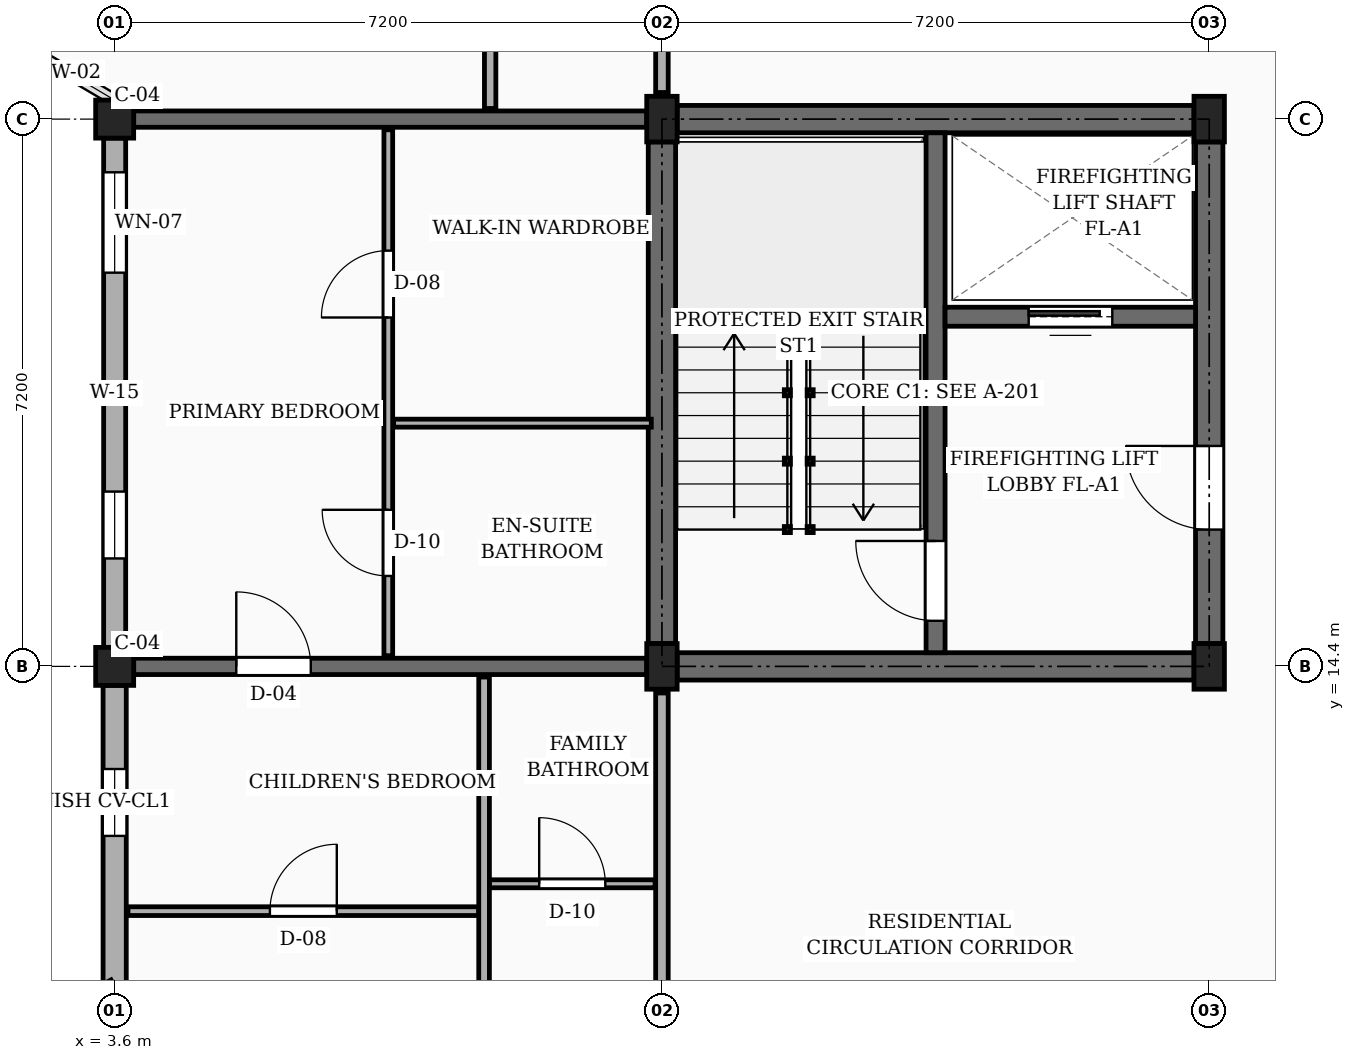
"""IFC4 building model, lengths in metres.
Left out: names, types, materials, properties, quantities, classifications, styles, units other than length and angle.
Written with IfcOpenShell. Run it as: python <this file> out.ifc"""

import sys

from ifc_helpers import new_model, si_unit, direction, frame, frame_2d, origin, origin_2d, place, context, subcontext, project, spatial, rectangle, extrude, element, fill, save


model = new_model("IFC4")
c1 = context("Model", 3, precision=1e-05, world=origin(), true_north=direction((0.0, 1.0)))
c2 = subcontext(c1, "Body", "Model", "MODEL_VIEW")
j1 = project(units=[si_unit("LENGTHUNIT", "METRE"), si_unit("PLANEANGLEUNIT", "RADIAN")], contexts=[c1])
p1 = place(None, origin())
s1 = spatial("IfcSite", under=j1, at=p1, CompositionType="ELEMENT")
p2 = place(p1, origin())
s2 = spatial("IfcBuilding", under=s1, at=p2, CompositionType="ELEMENT")
p3 = place(p2, frame((0.0, 0.0, 29.7)))
s3 = spatial("IfcBuildingStorey", under=s2, at=p3, CompositionType="ELEMENT", Elevation=29.7)
for number, where, z_axis, x_axis in (
    (1, (3.6, 14.4, 0.0), (0.0, 0.0, 1.0), (1.0, 0.0, 0.0)),
    (2, (3.6, 21.6, 0.0), (0.0, 0.0, 1.0), (1.0, 0.0, 0.0)),
):
    element("IfcColumn", number, at=place(p3, frame(where, z_axis=z_axis, x_axis=x_axis)), inside=s3, PredefinedType="COLUMN", context=c2, shape_type="SweptSolid", body=[
        extrude(rectangle(XDim=0.5, YDim=0.5, at=origin_2d()), origin(), (0.0, 0.0, 1.0), 3.15),
    ])
for number, where, z_axis, x_axis in (
    (3, (10.8, 14.4, 0.0), (0.0, 0.0, 1.0), (1.0, 0.0, 0.0)),
    (4, (10.8, 21.6, 0.0), (0.0, 0.0, 1.0), (1.0, 0.0, 0.0)),
    (5, (18.0, 14.4, 0.0), (0.0, 0.0, 1.0), (1.0, 0.0, 0.0)),
    (6, (18.0, 21.6, 0.0), (0.0, 0.0, 1.0), (1.0, 0.0, 0.0)),
):
    element("IfcColumn", number, at=place(p3, frame(where, z_axis=z_axis, x_axis=x_axis)), inside=s3, PredefinedType="COLUMN", context=c2, shape_type="SweptSolid", body=[
        extrude(rectangle(XDim=0.4, YDim=0.6, at=origin_2d()), origin(), (0.0, 0.0, 1.0), 3.15),
    ])
p4 = place(p3, frame((3.85, 14.4, 0.0), z_axis=(0.0, 0.0, 1.0), x_axis=(1.0, 0.0, 0.0)))
e7 = element("IfcWall", 7, at=p4, inside=s3, PredefinedType="SOLIDWALL", context=c2, shape_type="SweptSolid", body=[
    extrude(rectangle(XDim=6.75, YDim=0.215, at=frame_2d((3.375, 0.0))), origin(), (0.0, 0.0, 1.0), 2.17),
])
p5 = place(p4, frame((1.35, 0.0, 0.0)))
e8 = element("IfcOpeningElement", 8, at=p5, cuts=e7, PredefinedType="OPENING", context=c2, shape_type="SweptSolid", body=[
    extrude(rectangle(XDim=0.98, YDim=2.12, at=frame_2d((0.49, 1.06))), frame((0.0, 0.118, 0.0), z_axis=(0.0, -1.0, 0.0), x_axis=(1.0, 0.0, 0.0)), (0.0, 0.0, 1.0), 0.235),
])
p6 = place(p3, frame((3.85, 21.6, 0.0), z_axis=(0.0, 0.0, 1.0), x_axis=(1.0, 0.0, 0.0)))
e9 = element("IfcWall", 9, at=p6, inside=s3, PredefinedType="SOLIDWALL", context=c2, shape_type="SweptSolid", body=[
    extrude(rectangle(XDim=6.75, YDim=0.215, at=frame_2d((3.375, 0.0))), origin(), (0.0, 0.0, 1.0), 2.17),
])
p7 = place(p3, frame((3.6, 21.35, 0.0), z_axis=(0.0, 0.0, 1.0), x_axis=(0.0, -1.0, 0.0)))
e10 = element("IfcWall", 10, at=p7, inside=s3, PredefinedType="SOLIDWALL", context=c2, shape_type="SweptSolid", body=[
    extrude(rectangle(XDim=6.7, YDim=0.29, at=frame_2d((3.35, 0.0))), origin(), (0.0, 0.0, 1.0), 2.44),
])
p8 = place(p7, frame((0.45, 0.0, 0.78)))
e11 = element("IfcOpeningElement", 11, at=p8, cuts=e10, PredefinedType="OPENING", context=c2, shape_type="SweptSolid", body=[
    extrude(rectangle(XDim=1.32, YDim=1.15, at=frame_2d((0.66, 0.575))), frame((0.0, 0.155, 0.0), z_axis=(0.0, -1.0, 0.0), x_axis=(1.0, 0.0, 0.0)), (0.0, 0.0, 1.0), 0.31),
])
p9 = place(p7, frame((4.65, 0.0, 0.78)))
e12 = element("IfcOpeningElement", 12, at=p9, cuts=e10, PredefinedType="OPENING", context=c2, shape_type="SweptSolid", body=[
    extrude(rectangle(XDim=0.88, YDim=1.26, at=frame_2d((0.44, 0.63))), frame((0.0, 0.155, 0.0), z_axis=(0.0, -1.0, 0.0), x_axis=(1.0, 0.0, 0.0)), (0.0, 0.0, 1.0), 0.31),
])
p10 = place(p3, frame((3.6, 14.15, 0.0), z_axis=(0.0, 0.0, 1.0), x_axis=(0.0, -1.0, 0.0)))
e13 = element("IfcWall", 13, at=p10, inside=s3, PredefinedType="SOLIDWALL", context=c2, shape_type="SweptSolid", body=[
    extrude(rectangle(XDim=3.93, YDim=0.305, at=frame_2d((1.965, 0.0))), origin(), (0.0, 0.0, 1.0), 2.44),
])
p11 = place(p10, frame((1.1, 0.0, 0.78)))
e14 = element("IfcOpeningElement", 14, at=p11, cuts=e13, PredefinedType="OPENING", context=c2, shape_type="SweptSolid", body=[
    extrude(rectangle(XDim=0.88, YDim=1.26, at=frame_2d((0.44, 0.63))), frame((0.0, 0.163, 0.0), z_axis=(0.0, -1.0, 0.0), x_axis=(1.0, 0.0, 0.0)), (0.0, 0.0, 1.0), 0.325),
])
p12 = place(p3, frame((10.8, 14.7, 0.0), z_axis=(0.0, 0.0, 1.0), x_axis=(0.0, 1.0, 0.0)))
e15 = element("IfcWall", 15, at=p12, inside=s3, PredefinedType="SHEAR", context=c2, shape_type="SweptSolid", body=[
    extrude(rectangle(XDim=6.6, YDim=0.36, at=frame_2d((3.3, 0.0))), origin(), (0.0, 0.0, 1.0), 2.87),
])
p13 = place(p3, frame((11.0, 21.6, 0.0), z_axis=(0.0, 0.0, 1.0), x_axis=(1.0, 0.0, 0.0)))
e16 = element("IfcWall", 16, at=p13, inside=s3, PredefinedType="SHEAR", context=c2, shape_type="SweptSolid", body=[
    extrude(rectangle(XDim=6.8, YDim=0.36, at=frame_2d((3.4, 0.0))), origin(), (0.0, 0.0, 1.0), 2.87),
])
p14 = place(p3, frame((18.0, 14.7, 0.0), z_axis=(0.0, 0.0, 1.0), x_axis=(0.0, 1.0, 0.0)))
e17 = element("IfcWall", 17, at=p14, inside=s3, PredefinedType="SHEAR", context=c2, shape_type="SweptSolid", body=[
    extrude(rectangle(XDim=6.6, YDim=0.36, at=frame_2d((3.3, 0.0))), origin(), (0.0, 0.0, 1.0), 2.87),
])
p15 = place(p14, frame((1.5, 0.0, 0.0)))
e18 = element("IfcOpeningElement", 18, at=p15, cuts=e17, PredefinedType="OPENING", context=c2, shape_type="SweptSolid", body=[
    extrude(rectangle(XDim=1.1, YDim=2.15, at=frame_2d((0.55, 1.075))), frame((0.0, 0.19, 0.0), z_axis=(0.0, -1.0, 0.0), x_axis=(1.0, 0.0, 0.0)), (0.0, 0.0, 1.0), 0.38),
])
p16 = place(p3, frame((11.0, 14.4, 0.0), z_axis=(0.0, 0.0, 1.0), x_axis=(1.0, 0.0, 0.0)))
e19 = element("IfcWall", 19, at=p16, inside=s3, PredefinedType="SHEAR", context=c2, shape_type="SweptSolid", body=[
    extrude(rectangle(XDim=6.8, YDim=0.36, at=frame_2d((3.4, 0.0))), origin(), (0.0, 0.0, 1.0), 2.87),
])
p17 = place(p3, frame((14.4, 14.58, 0.0), z_axis=(0.0, 0.0, 1.0), x_axis=(0.0, 1.0, 0.0)))
e20 = element("IfcWall", 20, at=p17, inside=s3, PredefinedType="SHEAR", context=c2, shape_type="SweptSolid", body=[
    extrude(rectangle(XDim=6.84, YDim=0.25, at=frame_2d((3.42, 0.0))), origin(), (0.0, 0.0, 1.0), 2.87),
])
p18 = place(p17, frame((0.42, 0.0, 0.0)))
e21 = element("IfcOpeningElement", 21, at=p18, cuts=e20, PredefinedType="OPENING", context=c2, shape_type="SweptSolid", body=[
    extrude(rectangle(XDim=1.05, YDim=2.15, at=frame_2d((0.525, 1.075))), frame((0.0, 0.135, 0.0), z_axis=(0.0, -1.0, 0.0), x_axis=(1.0, 0.0, 0.0)), (0.0, 0.0, 1.0), 0.27),
])
p19 = place(p3, frame((14.525, 19.0, 0.0), z_axis=(0.0, 0.0, 1.0), x_axis=(1.0, 0.0, 0.0)))
e22 = element("IfcWall", 22, at=p19, inside=s3, PredefinedType="SHEAR", context=c2, shape_type="SweptSolid", body=[
    extrude(rectangle(XDim=3.295, YDim=0.25, at=frame_2d((1.647, 0.0))), origin(), (0.0, 0.0, 1.0), 2.87),
])
p20 = place(p19, frame((1.1, 0.0, 0.0)))
e23 = element("IfcOpeningElement", 23, at=p20, cuts=e22, PredefinedType="OPENING", context=c2, shape_type="SweptSolid", body=[
    extrude(rectangle(XDim=1.1, YDim=2.2, at=frame_2d((0.55, 1.1))), frame((0.0, 0.135, 0.0), z_axis=(0.0, -1.0, 0.0), x_axis=(1.0, 0.0, 0.0)), (0.0, 0.0, 1.0), 0.27),
])
p21 = place(p3, frame((10.8, 7.55, 0.0), z_axis=(0.0, 0.0, 1.0), x_axis=(0.0, 1.0, 0.0)))
e24 = element("IfcWall", 24, at=p21, inside=s3, PredefinedType="PARTITIONING", context=c2, shape_type="SweptSolid", body=[
    extrude(rectangle(XDim=6.5, YDim=0.165, at=frame_2d((3.25, 0.0))), origin(), (0.0, 0.0, 1.0), 2.305),
])
p22 = place(p21, frame((1.0, 0.0, 0.0)))
e25 = element("IfcOpeningElement", 25, at=p22, cuts=e24, PredefinedType="OPENING", context=c2, shape_type="SweptSolid", body=[
    extrude(rectangle(XDim=1.14, YDim=2.18, at=frame_2d((0.57, 1.09))), frame((0.0, 0.093, 0.0), z_axis=(0.0, -1.0, 0.0), x_axis=(1.0, 0.0, 0.0)), (0.0, 0.0, 1.0), 0.185),
])
p23 = place(p3, frame((10.8, 21.95, 0.0), z_axis=(0.0, 0.0, 1.0), x_axis=(0.0, 1.0, 0.0)))
e26 = element("IfcWall", 26, at=p23, inside=s3, PredefinedType="PARTITIONING", context=c2, shape_type="SweptSolid", body=[
    extrude(rectangle(XDim=6.5, YDim=0.165, at=frame_2d((3.25, 0.0))), origin(), (0.0, 0.0, 1.0), 2.305),
])
p24 = place(p23, frame((1.0, 0.0, 0.0)))
e27 = element("IfcOpeningElement", 27, at=p24, cuts=e26, PredefinedType="OPENING", context=c2, shape_type="SweptSolid", body=[
    extrude(rectangle(XDim=1.0, YDim=2.15, at=frame_2d((0.5, 1.075))), frame((0.0, 0.093, 0.0), z_axis=(0.0, -1.0, 0.0), x_axis=(1.0, 0.0, 0.0)), (0.0, 0.0, 1.0), 0.185),
])
p25 = place(p3, frame((3.775, 11.18, 0.0), z_axis=(0.0, 0.0, 1.0), x_axis=(1.0, 0.0, 0.0)))
e28 = element("IfcWall", 28, at=p25, inside=s3, PredefinedType="PARTITIONING", context=c2, shape_type="SweptSolid", body=[
    extrude(rectangle(XDim=4.615, YDim=0.115, at=frame_2d((2.308, 0.0))), origin(), (0.0, 0.0, 1.0), 2.305),
])
p26 = place(p25, frame((1.867, 0.0, 0.0)))
e29 = element("IfcOpeningElement", 29, at=p26, cuts=e28, PredefinedType="OPENING", context=c2, shape_type="SweptSolid", body=[
    extrude(rectangle(XDim=0.88, YDim=2.08, at=frame_2d((0.44, 1.04))), frame((0.0, 0.067, 0.0), z_axis=(0.0, -1.0, 0.0), x_axis=(1.0, 0.0, 0.0)), (0.0, 0.0, 1.0), 0.135),
])
p27 = place(p3, frame((8.53, 11.54, 0.0), z_axis=(0.0, 0.0, 1.0), x_axis=(1.0, 0.0, 0.0)))
e30 = element("IfcWall", 30, at=p27, inside=s3, PredefinedType="PARTITIONING", context=c2, shape_type="SweptSolid", body=[
    extrude(rectangle(XDim=2.18, YDim=0.105, at=frame_2d((1.09, 0.0))), origin(), (0.0, 0.0, 1.0), 2.305),
])
p28 = place(p27, frame((0.655, 0.0, 0.0)))
e31 = element("IfcOpeningElement", 31, at=p28, cuts=e30, PredefinedType="OPENING", context=c2, shape_type="SweptSolid", body=[
    extrude(rectangle(XDim=0.87, YDim=2.05, at=frame_2d((0.435, 1.025))), frame((0.0, 0.062, 0.0), z_axis=(0.0, -1.0, 0.0), x_axis=(1.0, 0.0, 0.0)), (0.0, 0.0, 1.0), 0.125),
])
p29 = place(p3, frame((8.46, 7.375, 0.0), z_axis=(0.0, 0.0, 1.0), x_axis=(0.0, 1.0, 0.0)))
e32 = element("IfcWall", 32, at=p29, inside=s3, PredefinedType="PARTITIONING", context=c2, shape_type="SweptSolid", body=[
    extrude(rectangle(XDim=6.885, YDim=0.14, at=frame_2d((3.442, 0.0))), origin(), (0.0, 0.0, 1.0), 2.305),
])
p30 = place(p29, frame((1.275, 0.0, 0.0)))
e33 = element("IfcOpeningElement", 33, at=p30, cuts=e32, PredefinedType="OPENING", context=c2, shape_type="SweptSolid", body=[
    extrude(rectangle(XDim=0.92, YDim=2.1, at=frame_2d((0.46, 1.05))), frame((0.0, 0.08, 0.0), z_axis=(0.0, -1.0, 0.0), x_axis=(1.0, 0.0, 0.0)), (0.0, 0.0, 1.0), 0.16),
])
p31 = place(p3, frame((7.2, 14.54, 0.0), z_axis=(0.0, 0.0, 1.0), x_axis=(0.0, 1.0, 0.0)))
e34 = element("IfcWall", 34, at=p31, inside=s3, PredefinedType="PARTITIONING", context=c2, shape_type="SweptSolid", body=[
    extrude(rectangle(XDim=6.92, YDim=0.115, at=frame_2d((3.46, 0.0))), origin(), (0.0, 0.0, 1.0), 2.305),
])
p32 = place(p31, frame((1.05, 0.0, 0.0)))
e35 = element("IfcOpeningElement", 35, at=p32, cuts=e34, PredefinedType="OPENING", context=c2, shape_type="SweptSolid", body=[
    extrude(rectangle(XDim=0.87, YDim=2.05, at=frame_2d((0.435, 1.025))), frame((0.0, 0.067, 0.0), z_axis=(0.0, -1.0, 0.0), x_axis=(1.0, 0.0, 0.0)), (0.0, 0.0, 1.0), 0.135),
])
p33 = place(p31, frame((4.45, 0.0, 0.0)))
e36 = element("IfcOpeningElement", 36, at=p33, cuts=e34, PredefinedType="OPENING", context=c2, shape_type="SweptSolid", body=[
    extrude(rectangle(XDim=0.88, YDim=2.08, at=frame_2d((0.44, 1.04))), frame((0.0, 0.067, 0.0), z_axis=(0.0, -1.0, 0.0), x_axis=(1.0, 0.0, 0.0)), (0.0, 0.0, 1.0), 0.135),
])
p34 = place(p3, frame((7.27, 17.6, 0.0), z_axis=(0.0, 0.0, 1.0), x_axis=(1.0, 0.0, 0.0)))
e37 = element("IfcWall", 37, at=p34, inside=s3, PredefinedType="PARTITIONING", context=c2, shape_type="SweptSolid", body=[
    extrude(rectangle(XDim=3.39, YDim=0.105, at=frame_2d((1.695, 0.0))), origin(), (0.0, 0.0, 1.0), 2.305),
])
p35 = place(p3, frame((8.54, 21.74, 0.0), z_axis=(0.0, 0.0, 1.0), x_axis=(0.0, 1.0, 0.0)))
e38 = element("IfcWall", 38, at=p35, inside=s3, PredefinedType="PARTITIONING", context=c2, shape_type="SweptSolid", body=[
    extrude(rectangle(XDim=6.92, YDim=0.15, at=frame_2d((3.46, 0.0))), origin(), (0.0, 0.0, 1.0), 2.305),
])
p36 = place(p35, frame((1.31, 0.0, 0.0)))
e39 = element("IfcOpeningElement", 39, at=p36, cuts=e38, PredefinedType="OPENING", context=c2, shape_type="SweptSolid", body=[
    extrude(rectangle(XDim=0.95, YDim=2.1, at=frame_2d((0.475, 1.05))), frame((0.0, 0.085, 0.0), z_axis=(0.0, -1.0, 0.0), x_axis=(1.0, 0.0, 0.0)), (0.0, 0.0, 1.0), 0.17),
])
p37 = place(p8, origin())
e40 = element("IfcWindow", 40, at=p37, inside=s3, PartitioningType="SINGLE_PANEL", PredefinedType="WINDOW", context=c2, shape_type="SweptSolid", body=[
    extrude(rectangle(XDim=1.32, YDim=1.15, at=frame_2d((0.66, 0.575))), frame((0.0, 0.03, 0.0), z_axis=(0.0, -1.0, 0.0), x_axis=(1.0, 0.0, 0.0)), (0.0, 0.0, 1.0), 0.06),
])
fill(e11, e40)
p38 = place(p9, origin())
e41 = element("IfcWindow", 41, at=p38, inside=s3, PartitioningType="SINGLE_PANEL", PredefinedType="WINDOW", context=c2, shape_type="SweptSolid", body=[
    extrude(rectangle(XDim=0.88, YDim=1.26, at=frame_2d((0.44, 0.63))), frame((0.0, 0.03, 0.0), z_axis=(0.0, -1.0, 0.0), x_axis=(1.0, 0.0, 0.0)), (0.0, 0.0, 1.0), 0.06),
])
fill(e12, e41)
p39 = place(p11, origin())
e42 = element("IfcWindow", 42, at=p39, inside=s3, PartitioningType="SINGLE_PANEL", PredefinedType="WINDOW", context=c2, shape_type="SweptSolid", body=[
    extrude(rectangle(XDim=0.88, YDim=1.26, at=frame_2d((0.44, 0.63))), frame((0.0, 0.03, 0.0), z_axis=(0.0, -1.0, 0.0), x_axis=(1.0, 0.0, 0.0)), (0.0, 0.0, 1.0), 0.06),
])
fill(e14, e42)
p40 = place(p15, frame((1.1, 0.0, 0.0), z_axis=(0.0, 0.0, 1.0), x_axis=(-1.0, 0.0, 0.0)))
e43 = element("IfcDoor", 43, at=p40, inside=s3, OperationType="SINGLE_SWING_RIGHT", PredefinedType="DOOR", context=c2, shape_type="SweptSolid", body=[
    extrude(rectangle(XDim=1.1, YDim=2.15, at=frame_2d((0.55, 1.075))), frame((0.0, 0.025, 0.0), z_axis=(0.0, -1.0, 0.0), x_axis=(1.0, 0.0, 0.0)), (0.0, 0.0, 1.0), 0.05),
])
fill(e18, e43)
p41 = place(p18, origin())
e44 = element("IfcDoor", 44, at=p41, inside=s3, OperationType="SINGLE_SWING_RIGHT", PredefinedType="DOOR", context=c2, shape_type="SweptSolid", body=[
    extrude(rectangle(XDim=1.05, YDim=2.15, at=frame_2d((0.525, 1.075))), frame((0.0, 0.025, 0.0), z_axis=(0.0, -1.0, 0.0), x_axis=(1.0, 0.0, 0.0)), (0.0, 0.0, 1.0), 0.05),
])
fill(e21, e44)
p42 = place(p20, origin())
e45 = element("IfcDoor", 45, at=p42, inside=s3, OperationType="SLIDING_TO_LEFT", PredefinedType="DOOR", context=c2, shape_type="SweptSolid", body=[
    extrude(rectangle(XDim=1.1, YDim=2.2, at=frame_2d((0.55, 1.1))), frame((0.0, 0.025, 0.0), z_axis=(0.0, -1.0, 0.0), x_axis=(1.0, 0.0, 0.0)), (0.0, 0.0, 1.0), 0.05),
])
fill(e23, e45)
p43 = place(p26, origin())
e46 = element("IfcDoor", 46, at=p43, inside=s3, OperationType="SINGLE_SWING_RIGHT", PredefinedType="DOOR", context=c2, shape_type="SweptSolid", body=[
    extrude(rectangle(XDim=0.88, YDim=2.08, at=frame_2d((0.44, 1.04))), frame((0.0, 0.025, 0.0), z_axis=(0.0, -1.0, 0.0), x_axis=(1.0, 0.0, 0.0)), (0.0, 0.0, 1.0), 0.05),
])
fill(e29, e46)
p44 = place(p28, origin())
e47 = element("IfcDoor", 47, at=p44, inside=s3, OperationType="SINGLE_SWING_LEFT", PredefinedType="DOOR", context=c2, shape_type="SweptSolid", body=[
    extrude(rectangle(XDim=0.87, YDim=2.05, at=frame_2d((0.435, 1.025))), frame((0.0, 0.025, 0.0), z_axis=(0.0, -1.0, 0.0), x_axis=(1.0, 0.0, 0.0)), (0.0, 0.0, 1.0), 0.05),
])
fill(e31, e47)
p45 = place(p32, origin())
e48 = element("IfcDoor", 48, at=p45, inside=s3, OperationType="SINGLE_SWING_RIGHT", PredefinedType="DOOR", context=c2, shape_type="SweptSolid", body=[
    extrude(rectangle(XDim=0.87, YDim=2.05, at=frame_2d((0.435, 1.025))), frame((0.0, 0.025, 0.0), z_axis=(0.0, -1.0, 0.0), x_axis=(1.0, 0.0, 0.0)), (0.0, 0.0, 1.0), 0.05),
])
fill(e35, e48)
p46 = place(p33, origin())
e49 = element("IfcDoor", 49, at=p46, inside=s3, OperationType="SINGLE_SWING_LEFT", PredefinedType="DOOR", context=c2, shape_type="SweptSolid", body=[
    extrude(rectangle(XDim=0.88, YDim=2.08, at=frame_2d((0.44, 1.04))), frame((0.0, 0.025, 0.0), z_axis=(0.0, -1.0, 0.0), x_axis=(1.0, 0.0, 0.0)), (0.0, 0.0, 1.0), 0.05),
])
fill(e36, e49)
p47 = place(p5, origin())
e50 = element("IfcDoor", 50, at=p47, inside=s3, OperationType="SINGLE_SWING_LEFT", PredefinedType="DOOR", context=c2, shape_type="SweptSolid", body=[
    extrude(rectangle(XDim=0.98, YDim=2.12, at=frame_2d((0.49, 1.06))), frame((0.0, 0.025, 0.0), z_axis=(0.0, -1.0, 0.0), x_axis=(1.0, 0.0, 0.0)), (0.0, 0.0, 1.0), 0.05),
])
fill(e8, e50)
save(model, sys.argv[1])
